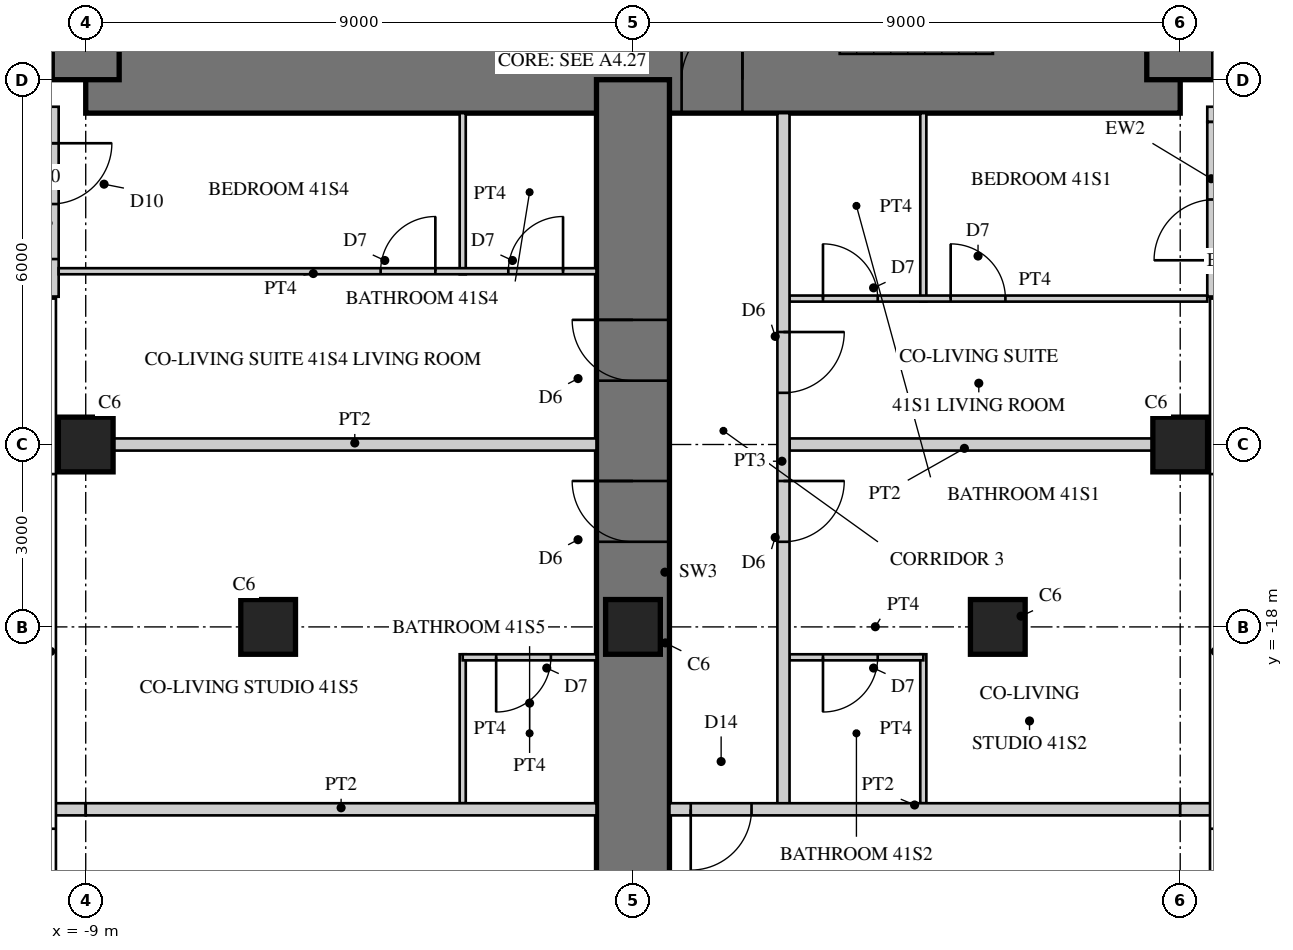
"""IFC4 building model, lengths in metres.
Left out: names, types, materials, properties, quantities, classifications, styles, units other than length and angle.
Written with IfcOpenShell. Run it as: python <this file> out.ifc"""

import sys

from ifc_helpers import new_model, si_unit, direction, frame, frame_2d, origin, origin_2d, place, context, subcontext, project, spatial, rectangle, hollow_rectangle, extrude, element, fill, save


model = new_model("IFC4")
c1 = context("Model", 3, precision=1e-05, world=origin(), true_north=direction((0.0, 1.0)))
c2 = subcontext(c1, "Body", "Model", "MODEL_VIEW")
j1 = project(units=[si_unit("LENGTHUNIT", "METRE"), si_unit("PLANEANGLEUNIT", "RADIAN")], contexts=[c1])
p1 = place(None, origin())
s1 = spatial("IfcSite", under=j1, at=p1, CompositionType="ELEMENT")
p2 = place(p1, origin())
s2 = spatial("IfcBuilding", under=s1, at=p2, CompositionType="ELEMENT")
p3 = place(p2, frame((0.0, 0.0, 169.5)))
s3 = spatial("IfcBuildingStorey", under=s2, at=p3, CompositionType="ELEMENT", Elevation=169.5)
p4 = place(p3, frame((-9.0, -9.0, 0.0), z_axis=(0.0, 0.0, 1.0), x_axis=(1.0, 0.0, 0.0)))
e1 = element("IfcWall", 1, at=p4, inside=s3, PredefinedType="SHEAR", context=c2, shape_type="SweptSolid", body=[
    extrude(rectangle(XDim=18.0, YDim=1.1, at=frame_2d((9.0, 0.0))), origin(), (0.0, 0.0, 1.0), 3.4),
])
p5 = place(p4, frame((9.8, 0.0, 0.0)))
e2 = element("IfcOpeningElement", 2, at=p5, cuts=e1, PredefinedType="OPENING", context=c2, shape_type="SweptSolid", body=[
    extrude(rectangle(XDim=1.0, YDim=2.4, at=frame_2d((0.5, 1.2))), frame((0.0, 0.56, 0.0), z_axis=(0.0, -1.0, 0.0), x_axis=(1.0, 0.0, 0.0)), (0.0, 0.0, 1.0), 1.12),
])
p6 = place(p3, frame((9.0, -9.0, 0.0), z_axis=(0.0, 0.0, 1.0), x_axis=(0.0, 1.0, 0.0)))
e3 = element("IfcWall", 3, at=p6, inside=s3, PredefinedType="SHEAR", context=c2, shape_type="SweptSolid", body=[
    extrude(rectangle(XDim=18.0, YDim=1.1, at=frame_2d((9.0, 0.0))), origin(), (0.0, 0.0, 1.0), 3.4),
])
p7 = place(p6, frame((9.8, 0.0, 0.0)))
e4 = element("IfcOpeningElement", 4, at=p7, cuts=e3, PredefinedType="OPENING", context=c2, shape_type="SweptSolid", body=[
    extrude(rectangle(XDim=1.0, YDim=2.4, at=frame_2d((0.5, 1.2))), frame((0.0, 0.56, 0.0), z_axis=(0.0, -1.0, 0.0), x_axis=(1.0, 0.0, 0.0)), (0.0, 0.0, 1.0), 1.12),
])
p8 = place(p3, frame((-9.0, 9.0, 0.0), z_axis=(0.0, 0.0, 1.0), x_axis=(0.0, -1.0, 0.0)))
e5 = element("IfcWall", 5, at=p8, inside=s3, PredefinedType="SHEAR", context=c2, shape_type="SweptSolid", body=[
    extrude(rectangle(XDim=18.0, YDim=1.1, at=frame_2d((9.0, 0.0))), origin(), (0.0, 0.0, 1.0), 3.4),
])
p9 = place(p8, frame((9.8, 0.0, 0.0)))
e6 = element("IfcOpeningElement", 6, at=p9, cuts=e5, PredefinedType="OPENING", context=c2, shape_type="SweptSolid", body=[
    extrude(rectangle(XDim=1.0, YDim=2.4, at=frame_2d((0.5, 1.2))), frame((0.0, 0.56, 0.0), z_axis=(0.0, -1.0, 0.0), x_axis=(1.0, 0.0, 0.0)), (0.0, 0.0, 1.0), 1.12),
])
p10 = place(p3, frame((0.0, -9.0, 0.0), z_axis=(0.0, 0.0, 1.0), x_axis=(0.0, -1.0, 0.0)))
e7 = element("IfcWall", 7, at=p10, inside=s3, PredefinedType="SHEAR", context=c2, shape_type="SweptSolid", body=[
    extrude(rectangle(XDim=18.0, YDim=1.2, at=frame_2d((9.0, 0.0))), origin(), (0.0, 0.0, 1.0), 3.4),
])
p11 = place(p10, frame((3.95, 0.0, 0.0)))
e8 = element("IfcOpeningElement", 8, at=p11, cuts=e7, PredefinedType="OPENING", context=c2, shape_type="SweptSolid", body=[
    extrude(rectangle(XDim=1.0, YDim=2.15, at=frame_2d((0.5, 1.075))), frame((0.0, 0.61, 0.0), z_axis=(0.0, -1.0, 0.0), x_axis=(1.0, 0.0, 0.0)), (0.0, 0.0, 1.0), 1.22),
])
p12 = place(p10, frame((6.6, 0.0, 0.0)))
e9 = element("IfcOpeningElement", 9, at=p12, cuts=e7, PredefinedType="OPENING", context=c2, shape_type="SweptSolid", body=[
    extrude(rectangle(XDim=1.0, YDim=2.15, at=frame_2d((0.5, 1.075))), frame((0.0, 0.61, 0.0), z_axis=(0.0, -1.0, 0.0), x_axis=(1.0, 0.0, 0.0)), (0.0, 0.0, 1.0), 1.22),
])
p13 = place(p10, frame((13.25, 0.0, 0.0)))
e10 = element("IfcOpeningElement", 10, at=p13, cuts=e7, PredefinedType="OPENING", context=c2, shape_type="SweptSolid", body=[
    extrude(rectangle(XDim=1.0, YDim=2.2, at=frame_2d((0.5, 1.1))), frame((0.0, 0.61, 0.0), z_axis=(0.0, -1.0, 0.0), x_axis=(1.0, 0.0, 0.0)), (0.0, 0.0, 1.0), 1.22),
])
for number, where, z_axis, x_axis in (
    (11, (-9.0, -15.0, 0.0), (0.0, 0.0, 1.0), (1.0, 0.0, 0.0)),
    (12, (9.0, -15.0, 0.0), (0.0, 0.0, 1.0), (1.0, 0.0, 0.0)),
    (13, (-6.0, -18.0, 0.0), (0.0, 0.0, 1.0), (1.0, 0.0, 0.0)),
    (14, (0.0, -18.0, 0.0), (0.0, 0.0, 1.0), (1.0, 0.0, 0.0)),
    (15, (6.0, -18.0, 0.0), (0.0, 0.0, 1.0), (1.0, 0.0, 0.0)),
):
    element("IfcColumn", number, at=place(p3, frame(where, z_axis=z_axis, x_axis=x_axis)), inside=s3, PredefinedType="COLUMN", context=c2, shape_type="SweptSolid", body=[
        extrude(rectangle(XDim=0.9, YDim=0.9, at=origin_2d()), origin(), (0.0, 0.0, 1.0), 3.4),
    ])
p14 = place(p3, frame((9.445, -9.57, 0.0), z_axis=(0.0, 0.0, 1.0), x_axis=(1.0, 0.0, 0.0)))
e16 = element("IfcWall", 16, at=p14, inside=s3, PredefinedType="SOLIDWALL", context=c2, shape_type="SweptSolid", body=[
    extrude(rectangle(XDim=3.125, YDim=0.25, at=frame_2d((1.562, 0.0))), origin(), (0.0, 0.0, 1.0), 3.22),
])
p15 = place(p14, frame((0.6, 0.0, 0.0)))
e17 = element("IfcOpeningElement", 17, at=p15, cuts=e16, PredefinedType="OPENING", context=c2, shape_type="SweptSolid", body=[
    extrude(rectangle(XDim=1.0, YDim=2.2, at=frame_2d((0.5, 1.1))), frame((0.0, 0.135, 0.0), z_axis=(0.0, -1.0, 0.0), x_axis=(1.0, 0.0, 0.0)), (0.0, 0.0, 1.0), 0.27),
])
p16 = place(p3, frame((-9.57, -9.445, 0.0), z_axis=(0.0, 0.0, 1.0), x_axis=(0.0, -1.0, 0.0)))
e18 = element("IfcWall", 18, at=p16, inside=s3, PredefinedType="SOLIDWALL", context=c2, shape_type="SweptSolid", body=[
    extrude(rectangle(XDim=3.125, YDim=0.25, at=frame_2d((1.562, 0.0))), origin(), (0.0, 0.0, 1.0), 3.22),
])
p17 = place(p16, frame((0.6, 0.0, 0.0)))
e19 = element("IfcOpeningElement", 19, at=p17, cuts=e18, PredefinedType="OPENING", context=c2, shape_type="SweptSolid", body=[
    extrude(rectangle(XDim=1.0, YDim=2.2, at=frame_2d((0.5, 1.1))), frame((0.0, 0.135, 0.0), z_axis=(0.0, -1.0, 0.0), x_axis=(1.0, 0.0, 0.0)), (0.0, 0.0, 1.0), 0.27),
])
p18 = place(p3, frame((9.57, -12.57, 0.0), z_axis=(0.0, 0.0, 1.0), x_axis=(0.0, 1.0, 0.0)))
e20 = element("IfcWall", 20, at=p18, inside=s3, PredefinedType="SOLIDWALL", context=c2, shape_type="SweptSolid", body=[
    extrude(rectangle(XDim=2.875, YDim=0.25, at=frame_2d((1.438, 0.0))), origin(), (0.0, 0.0, 1.0), 3.22),
])
p19 = place(p18, frame((0.6, 0.0, 0.0)))
e21 = element("IfcOpeningElement", 21, at=p19, cuts=e20, PredefinedType="OPENING", context=c2, shape_type="SweptSolid", body=[
    extrude(rectangle(XDim=1.0, YDim=2.2, at=frame_2d((0.5, 1.1))), frame((0.0, 0.135, 0.0), z_axis=(0.0, -1.0, 0.0), x_axis=(1.0, 0.0, 0.0)), (0.0, 0.0, 1.0), 0.27),
])
p20 = place(p3, frame((4.775, -9.55, 0.0), z_axis=(0.0, 0.0, 1.0), x_axis=(0.0, -1.0, 0.0)))
e22 = element("IfcWall", 22, at=p20, inside=s3, PredefinedType="PARTITIONING", context=c2, shape_type="SweptSolid", body=[
    extrude(rectangle(XDim=3.1, YDim=0.1, at=frame_2d((1.55, 0.0))), origin(), (0.0, 0.0, 1.0), 3.22),
])
p21 = place(p3, frame((2.575, -12.6, 0.0), z_axis=(0.0, 0.0, 1.0), x_axis=(1.0, 0.0, 0.0)))
e23 = element("IfcWall", 23, at=p21, inside=s3, PredefinedType="PARTITIONING", context=c2, shape_type="SweptSolid", body=[
    extrude(rectangle(XDim=6.87, YDim=0.1, at=frame_2d((3.435, 0.0))), origin(), (0.0, 0.0, 1.0), 3.22),
])
p22 = place(p21, frame((0.55, 0.0, 0.0)))
e24 = element("IfcOpeningElement", 24, at=p22, cuts=e23, PredefinedType="OPENING", context=c2, shape_type="SweptSolid", body=[
    extrude(rectangle(XDim=0.9, YDim=2.1, at=frame_2d((0.45, 1.05))), frame((0.0, 0.06, 0.0), z_axis=(0.0, -1.0, 0.0), x_axis=(1.0, 0.0, 0.0)), (0.0, 0.0, 1.0), 0.12),
])
p23 = place(p21, frame((2.65, 0.0, 0.0)))
e25 = element("IfcOpeningElement", 25, at=p23, cuts=e23, PredefinedType="OPENING", context=c2, shape_type="SweptSolid", body=[
    extrude(rectangle(XDim=0.9, YDim=2.1, at=frame_2d((0.45, 1.05))), frame((0.0, 0.06, 0.0), z_axis=(0.0, -1.0, 0.0), x_axis=(1.0, 0.0, 0.0)), (0.0, 0.0, 1.0), 0.12),
])
p24 = place(p3, frame((-2.8, -9.55, 0.0), z_axis=(0.0, 0.0, 1.0), x_axis=(0.0, -1.0, 0.0)))
e26 = element("IfcWall", 26, at=p24, inside=s3, PredefinedType="PARTITIONING", context=c2, shape_type="SweptSolid", body=[
    extrude(rectangle(XDim=2.65, YDim=0.1, at=frame_2d((1.325, 0.0))), origin(), (0.0, 0.0, 1.0), 3.22),
])
p25 = place(p3, frame((-9.445, -12.15, 0.0), z_axis=(0.0, 0.0, 1.0), x_axis=(1.0, 0.0, 0.0)))
e27 = element("IfcWall", 27, at=p25, inside=s3, PredefinedType="PARTITIONING", context=c2, shape_type="SweptSolid", body=[
    extrude(rectangle(XDim=8.845, YDim=0.1, at=frame_2d((4.422, 0.0))), origin(), (0.0, 0.0, 1.0), 3.22),
])
p26 = place(p25, frame((5.295, 0.0, 0.0)))
e28 = element("IfcOpeningElement", 28, at=p26, cuts=e27, PredefinedType="OPENING", context=c2, shape_type="SweptSolid", body=[
    extrude(rectangle(XDim=0.9, YDim=2.1, at=frame_2d((0.45, 1.05))), frame((0.0, 0.06, 0.0), z_axis=(0.0, -1.0, 0.0), x_axis=(1.0, 0.0, 0.0)), (0.0, 0.0, 1.0), 0.12),
])
p27 = place(p25, frame((7.395, 0.0, 0.0)))
e29 = element("IfcOpeningElement", 29, at=p27, cuts=e27, PredefinedType="OPENING", context=c2, shape_type="SweptSolid", body=[
    extrude(rectangle(XDim=0.9, YDim=2.1, at=frame_2d((0.45, 1.05))), frame((0.0, 0.06, 0.0), z_axis=(0.0, -1.0, 0.0), x_axis=(1.0, 0.0, 0.0)), (0.0, 0.0, 1.0), 0.12),
])
p28 = place(p3, frame((2.575, -15.0, 0.0), z_axis=(0.0, 0.0, 1.0), x_axis=(1.0, 0.0, 0.0)))
e30 = element("IfcWall", 30, at=p28, inside=s3, PredefinedType="SOLIDWALL", context=c2, shape_type="SweptSolid", body=[
    extrude(rectangle(XDim=5.975, YDim=0.2, at=frame_2d((2.988, 0.0))), origin(), (0.0, 0.0, 1.0), 2.47),
])
p29 = place(p3, frame((-8.55, -15.0, 0.0), z_axis=(0.0, 0.0, 1.0), x_axis=(1.0, 0.0, 0.0)))
e31 = element("IfcWall", 31, at=p29, inside=s3, PredefinedType="SOLIDWALL", context=c2, shape_type="SweptSolid", body=[
    extrude(rectangle(XDim=7.95, YDim=0.2, at=frame_2d((3.975, 0.0))), origin(), (0.0, 0.0, 1.0), 2.47),
])
p30 = place(p3, frame((4.775, -18.45, 0.0), z_axis=(0.0, 0.0, 1.0), x_axis=(0.0, -1.0, 0.0)))
e32 = element("IfcWall", 32, at=p30, inside=s3, PredefinedType="PARTITIONING", context=c2, shape_type="SweptSolid", body=[
    extrude(rectangle(XDim=2.45, YDim=0.1, at=frame_2d((1.225, 0.0))), origin(), (0.0, 0.0, 1.0), 3.22),
])
p31 = place(p3, frame((2.575, -18.5, 0.0), z_axis=(0.0, 0.0, 1.0), x_axis=(1.0, 0.0, 0.0)))
e33 = element("IfcWall", 33, at=p31, inside=s3, PredefinedType="PARTITIONING", context=c2, shape_type="SweptSolid", body=[
    extrude(rectangle(XDim=2.2, YDim=0.1, at=frame_2d((1.1, 0.0))), origin(), (0.0, 0.0, 1.0), 3.22),
])
p32 = place(p31, frame((0.55, 0.0, 0.0)))
e34 = element("IfcOpeningElement", 34, at=p32, cuts=e33, PredefinedType="OPENING", context=c2, shape_type="SweptSolid", body=[
    extrude(rectangle(XDim=0.9, YDim=2.1, at=frame_2d((0.45, 1.05))), frame((0.0, 0.06, 0.0), z_axis=(0.0, -1.0, 0.0), x_axis=(1.0, 0.0, 0.0)), (0.0, 0.0, 1.0), 0.12),
])
p33 = place(p3, frame((-2.8, -18.45, 0.0), z_axis=(0.0, 0.0, 1.0), x_axis=(0.0, -1.0, 0.0)))
e35 = element("IfcWall", 35, at=p33, inside=s3, PredefinedType="PARTITIONING", context=c2, shape_type="SweptSolid", body=[
    extrude(rectangle(XDim=2.45, YDim=0.1, at=frame_2d((1.225, 0.0))), origin(), (0.0, 0.0, 1.0), 3.22),
])
p34 = place(p3, frame((-2.8, -18.5, 0.0), z_axis=(0.0, 0.0, 1.0), x_axis=(1.0, 0.0, 0.0)))
e36 = element("IfcWall", 36, at=p34, inside=s3, PredefinedType="PARTITIONING", context=c2, shape_type="SweptSolid", body=[
    extrude(rectangle(XDim=2.2, YDim=0.1, at=frame_2d((1.1, 0.0))), origin(), (0.0, 0.0, 1.0), 3.22),
])
p35 = place(p34, frame((0.55, 0.0, 0.0)))
e37 = element("IfcOpeningElement", 37, at=p35, cuts=e36, PredefinedType="OPENING", context=c2, shape_type="SweptSolid", body=[
    extrude(rectangle(XDim=0.9, YDim=2.1, at=frame_2d((0.45, 1.05))), frame((0.0, 0.06, 0.0), z_axis=(0.0, -1.0, 0.0), x_axis=(1.0, 0.0, 0.0)), (0.0, 0.0, 1.0), 0.12),
])
p36 = place(p3, frame((2.475, -9.55, 0.0), z_axis=(0.0, 0.0, 1.0), x_axis=(0.0, -1.0, 0.0)))
e38 = element("IfcWall", 38, at=p36, inside=s3, PredefinedType="SOLIDWALL", context=c2, shape_type="SweptSolid", body=[
    extrude(rectangle(XDim=11.45, YDim=0.2, at=frame_2d((5.725, 0.0))), origin(), (0.0, 0.0, 1.0), 3.22),
])
p37 = place(p36, frame((3.6, 0.0, 0.0)))
e39 = element("IfcOpeningElement", 39, at=p37, cuts=e38, PredefinedType="OPENING", context=c2, shape_type="SweptSolid", body=[
    extrude(rectangle(XDim=1.0, YDim=2.15, at=frame_2d((0.5, 1.075))), frame((0.0, 0.11, 0.0), z_axis=(0.0, -1.0, 0.0), x_axis=(1.0, 0.0, 0.0)), (0.0, 0.0, 1.0), 0.22),
])
p38 = place(p36, frame((6.05, 0.0, 0.0)))
e40 = element("IfcOpeningElement", 40, at=p38, cuts=e38, PredefinedType="OPENING", context=c2, shape_type="SweptSolid", body=[
    extrude(rectangle(XDim=1.0, YDim=2.15, at=frame_2d((0.5, 1.075))), frame((0.0, 0.11, 0.0), z_axis=(0.0, -1.0, 0.0), x_axis=(1.0, 0.0, 0.0)), (0.0, 0.0, 1.0), 0.22),
])
p39 = place(p3, frame((-9.53, -21.0, 0.0), z_axis=(0.0, 0.0, 1.0), x_axis=(1.0, 0.0, 0.0)))
e41 = element("IfcWall", 41, at=p39, inside=s3, PredefinedType="SOLIDWALL", context=c2, shape_type="SweptSolid", body=[
    extrude(rectangle(XDim=0.53, YDim=0.2, at=frame_2d((0.265, 0.0))), origin(), (0.0, 0.0, 1.0), 3.22),
])
p40 = place(p3, frame((-9.0, -21.0, 0.0), z_axis=(0.0, 0.0, 1.0), x_axis=(1.0, 0.0, 0.0)))
e42 = element("IfcWall", 42, at=p40, inside=s3, PredefinedType="SOLIDWALL", context=c2, shape_type="SweptSolid", body=[
    extrude(rectangle(XDim=8.4, YDim=0.2, at=frame_2d((4.2, 0.0))), origin(), (0.0, 0.0, 1.0), 2.62),
])
p41 = place(p3, frame((0.6, -21.0, 0.0), z_axis=(0.0, 0.0, 1.0), x_axis=(1.0, 0.0, 0.0)))
e43 = element("IfcWall", 43, at=p41, inside=s3, PredefinedType="SOLIDWALL", context=c2, shape_type="SweptSolid", body=[
    extrude(rectangle(XDim=8.4, YDim=0.2, at=frame_2d((4.2, 0.0))), origin(), (0.0, 0.0, 1.0), 2.62),
])
p42 = place(p41, frame((0.35, 0.0, 0.0)))
e44 = element("IfcOpeningElement", 44, at=p42, cuts=e43, PredefinedType="OPENING", context=c2, shape_type="SweptSolid", body=[
    extrude(rectangle(XDim=1.0, YDim=2.2, at=frame_2d((0.5, 1.1))), frame((0.0, 0.11, 0.0), z_axis=(0.0, -1.0, 0.0), x_axis=(1.0, 0.0, 0.0)), (0.0, 0.0, 1.0), 0.22),
])
p43 = place(p3, frame((9.0, -21.0, 0.0), z_axis=(0.0, 0.0, 1.0), x_axis=(1.0, 0.0, 0.0)))
e45 = element("IfcWall", 45, at=p43, inside=s3, PredefinedType="SOLIDWALL", context=c2, shape_type="SweptSolid", body=[
    extrude(rectangle(XDim=0.53, YDim=0.2, at=frame_2d((0.265, 0.0))), origin(), (0.0, 0.0, 1.0), 3.22),
])
p44 = place(p17, origin())
e46 = element("IfcDoor", 46, at=p44, inside=s3, OperationType="SINGLE_SWING_LEFT", PredefinedType="DOOR", context=c2, shape_type="SweptSolid", body=[
    extrude(hollow_rectangle(XDim=1.0, YDim=2.2, WallThickness=0.06, at=frame_2d((0.5, 1.1))), frame((0.0, 0.025, 0.0), z_axis=(0.0, -1.0, 0.0), x_axis=(1.0, 0.0, 0.0)), (0.0, 0.0, 1.0), 0.05),
    extrude(rectangle(XDim=0.879, YDim=2.079, at=frame_2d((0.5, 1.1))), frame((0.0, 0.025, 0.0), z_axis=(0.0, -1.0, 0.0), x_axis=(1.0, 0.0, 0.0)), (0.0, 0.0, 1.0), 0.05),
])
fill(e19, e46)
p45 = place(p19, origin())
e47 = element("IfcDoor", 47, at=p45, inside=s3, OperationType="SINGLE_SWING_LEFT", PredefinedType="DOOR", context=c2, shape_type="SweptSolid", body=[
    extrude(hollow_rectangle(XDim=1.0, YDim=2.2, WallThickness=0.06, at=frame_2d((0.5, 1.1))), frame((0.0, 0.025, 0.0), z_axis=(0.0, -1.0, 0.0), x_axis=(1.0, 0.0, 0.0)), (0.0, 0.0, 1.0), 0.05),
    extrude(rectangle(XDim=0.879, YDim=2.079, at=frame_2d((0.5, 1.1))), frame((0.0, 0.025, 0.0), z_axis=(0.0, -1.0, 0.0), x_axis=(1.0, 0.0, 0.0)), (0.0, 0.0, 1.0), 0.05),
])
fill(e21, e47)
p46 = place(p22, origin())
e48 = element("IfcDoor", 48, at=p46, inside=s3, OperationType="SINGLE_SWING_LEFT", PredefinedType="DOOR", context=c2, shape_type="SweptSolid", body=[
    extrude(rectangle(XDim=0.9, YDim=2.1, at=frame_2d((0.45, 1.05))), frame((0.0, 0.025, 0.0), z_axis=(0.0, -1.0, 0.0), x_axis=(1.0, 0.0, 0.0)), (0.0, 0.0, 1.0), 0.05),
])
fill(e24, e48)
p47 = place(p23, origin())
e49 = element("IfcDoor", 49, at=p47, inside=s3, OperationType="SINGLE_SWING_LEFT", PredefinedType="DOOR", context=c2, shape_type="SweptSolid", body=[
    extrude(rectangle(XDim=0.9, YDim=2.1, at=frame_2d((0.45, 1.05))), frame((0.0, 0.025, 0.0), z_axis=(0.0, -1.0, 0.0), x_axis=(1.0, 0.0, 0.0)), (0.0, 0.0, 1.0), 0.05),
])
fill(e25, e49)
p48 = place(p26, origin())
e50 = element("IfcDoor", 50, at=p48, inside=s3, OperationType="SINGLE_SWING_RIGHT", PredefinedType="DOOR", context=c2, shape_type="SweptSolid", body=[
    extrude(rectangle(XDim=0.9, YDim=2.1, at=frame_2d((0.45, 1.05))), frame((0.0, 0.025, 0.0), z_axis=(0.0, -1.0, 0.0), x_axis=(1.0, 0.0, 0.0)), (0.0, 0.0, 1.0), 0.05),
])
fill(e28, e50)
p49 = place(p27, origin())
e51 = element("IfcDoor", 51, at=p49, inside=s3, OperationType="SINGLE_SWING_RIGHT", PredefinedType="DOOR", context=c2, shape_type="SweptSolid", body=[
    extrude(rectangle(XDim=0.9, YDim=2.1, at=frame_2d((0.45, 1.05))), frame((0.0, 0.025, 0.0), z_axis=(0.0, -1.0, 0.0), x_axis=(1.0, 0.0, 0.0)), (0.0, 0.0, 1.0), 0.05),
])
fill(e29, e51)
p50 = place(p32, frame((0.9, 0.0, 0.0), z_axis=(0.0, 0.0, 1.0), x_axis=(-1.0, 0.0, 0.0)))
e52 = element("IfcDoor", 52, at=p50, inside=s3, OperationType="SINGLE_SWING_RIGHT", PredefinedType="DOOR", context=c2, shape_type="SweptSolid", body=[
    extrude(rectangle(XDim=0.9, YDim=2.1, at=frame_2d((0.45, 1.05))), frame((0.0, 0.025, 0.0), z_axis=(0.0, -1.0, 0.0), x_axis=(1.0, 0.0, 0.0)), (0.0, 0.0, 1.0), 0.05),
])
fill(e34, e52)
p51 = place(p35, frame((0.9, 0.0, 0.0), z_axis=(0.0, 0.0, 1.0), x_axis=(-1.0, 0.0, 0.0)))
e53 = element("IfcDoor", 53, at=p51, inside=s3, OperationType="SINGLE_SWING_RIGHT", PredefinedType="DOOR", context=c2, shape_type="SweptSolid", body=[
    extrude(rectangle(XDim=0.9, YDim=2.1, at=frame_2d((0.45, 1.05))), frame((0.0, 0.025, 0.0), z_axis=(0.0, -1.0, 0.0), x_axis=(1.0, 0.0, 0.0)), (0.0, 0.0, 1.0), 0.05),
])
fill(e37, e53)
p52 = place(p37, origin())
e54 = element("IfcDoor", 54, at=p52, inside=s3, OperationType="SINGLE_SWING_LEFT", PredefinedType="DOOR", context=c2, shape_type="SweptSolid", body=[
    extrude(rectangle(XDim=1.0, YDim=2.15, at=frame_2d((0.5, 1.075))), frame((0.0, 0.025, 0.0), z_axis=(0.0, -1.0, 0.0), x_axis=(1.0, 0.0, 0.0)), (0.0, 0.0, 1.0), 0.05),
])
fill(e39, e54)
p53 = place(p38, origin())
e55 = element("IfcDoor", 55, at=p53, inside=s3, OperationType="SINGLE_SWING_LEFT", PredefinedType="DOOR", context=c2, shape_type="SweptSolid", body=[
    extrude(rectangle(XDim=1.0, YDim=2.15, at=frame_2d((0.5, 1.075))), frame((0.0, 0.025, 0.0), z_axis=(0.0, -1.0, 0.0), x_axis=(1.0, 0.0, 0.0)), (0.0, 0.0, 1.0), 0.05),
])
fill(e40, e55)
p54 = place(p42, frame((1.0, 0.0, 0.0), z_axis=(0.0, 0.0, 1.0), x_axis=(-1.0, 0.0, 0.0)))
e56 = element("IfcDoor", 56, at=p54, inside=s3, OperationType="SINGLE_SWING_RIGHT", PredefinedType="DOOR", context=c2, shape_type="SweptSolid", body=[
    extrude(rectangle(XDim=1.0, YDim=2.2, at=frame_2d((0.5, 1.1))), frame((0.0, 0.025, 0.0), z_axis=(0.0, -1.0, 0.0), x_axis=(1.0, 0.0, 0.0)), (0.0, 0.0, 1.0), 0.05),
])
fill(e44, e56)
p55 = place(p11, frame((1.0, 0.0, 0.0), z_axis=(0.0, 0.0, 1.0), x_axis=(-1.0, 0.0, 0.0)))
e57 = element("IfcDoor", 57, at=p55, inside=s3, OperationType="SINGLE_SWING_RIGHT", PredefinedType="DOOR", context=c2, shape_type="SweptSolid", body=[
    extrude(rectangle(XDim=1.0, YDim=2.15, at=frame_2d((0.5, 1.075))), frame((0.0, 0.025, 0.0), z_axis=(0.0, -1.0, 0.0), x_axis=(1.0, 0.0, 0.0)), (0.0, 0.0, 1.0), 0.05),
])
fill(e8, e57)
p56 = place(p12, frame((1.0, 0.0, 0.0), z_axis=(0.0, 0.0, 1.0), x_axis=(-1.0, 0.0, 0.0)))
e58 = element("IfcDoor", 58, at=p56, inside=s3, OperationType="SINGLE_SWING_RIGHT", PredefinedType="DOOR", context=c2, shape_type="SweptSolid", body=[
    extrude(rectangle(XDim=1.0, YDim=2.15, at=frame_2d((0.5, 1.075))), frame((0.0, 0.025, 0.0), z_axis=(0.0, -1.0, 0.0), x_axis=(1.0, 0.0, 0.0)), (0.0, 0.0, 1.0), 0.05),
])
fill(e9, e58)
p57 = place(p5, origin())
e59 = element("IfcDoor", 59, at=p57, inside=s3, OperationType="SINGLE_SWING_RIGHT", PredefinedType="DOOR", context=c2, shape_type="SweptSolid", body=[
    extrude(rectangle(XDim=1.0, YDim=2.4, at=frame_2d((0.5, 1.2))), frame((0.0, 0.055, 0.0), z_axis=(0.0, -1.0, 0.0), x_axis=(1.0, 0.0, 0.0)), (0.0, 0.0, 1.0), 0.05),
])
fill(e2, e59)
save(model, sys.argv[1])
